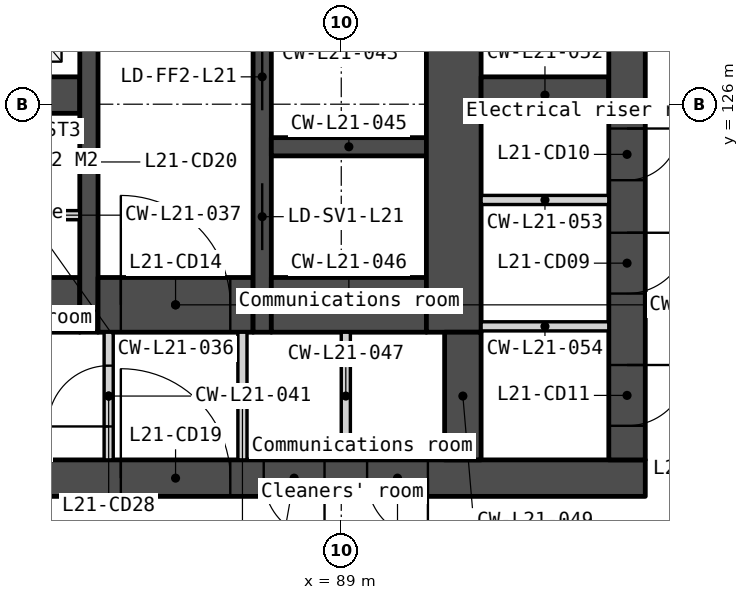
"""IFC4 building model, lengths in metres.
Left out: names, types, materials, properties, quantities, classifications, styles, units other than length and angle.
Written with IfcOpenShell. Run it as: python <this file> out.ifc"""

import sys

from ifc_helpers import new_model, si_unit, direction, frame, frame_2d, origin, place, context, subcontext, project, spatial, polyline, rectangle, outline, extrude, element, fill, save


model = new_model("IFC4")
c1 = context("Model", 3, precision=1e-05, world=origin(), true_north=direction((0.0, 1.0)))
c2 = subcontext(c1, "Body", "Model", "MODEL_VIEW")
j1 = project(units=[si_unit("LENGTHUNIT", "METRE"), si_unit("PLANEANGLEUNIT", "RADIAN")], contexts=[c1])
p1 = place(None, origin())
s1 = spatial("IfcSite", under=j1, at=p1, CompositionType="ELEMENT")
p2 = place(p1, origin())
s2 = spatial("IfcBuilding", under=s1, at=p2, CompositionType="ELEMENT")
p3 = place(p2, frame((0.0, 0.0, 88.8)))
s3 = spatial("IfcBuildingStorey", under=s2, at=p3, CompositionType="ELEMENT", Elevation=88.8)
p4 = place(p3, frame((66.0, 119.85, 0.0), z_axis=(0.0, 0.0, 1.0), x_axis=(1.0, 0.0, 0.0)))
e1 = element("IfcWall", 1, at=p4, inside=s3, PredefinedType="SOLIDWALL", context=c2, shape_type="SweptSolid", body=[
    extrude(rectangle(XDim=28.0, YDim=0.6, at=frame_2d((14.0, 0.0))), origin(), (0.0, 0.0, 1.0), 3.35),
])
p5 = place(p4, frame((6.825, 0.0, 0.0)))
e2 = element("IfcOpeningElement", 2, at=p5, cuts=e1, PredefinedType="OPENING", context=c2, shape_type="SweptSolid", body=[
    extrude(rectangle(XDim=1.8, YDim=2.1, at=frame_2d((0.9, 1.05))), frame((0.0, 0.31, 0.0), z_axis=(0.0, -1.0, 0.0), x_axis=(1.0, 0.0, 0.0)), (0.0, 0.0, 1.0), 0.62),
])
p6 = place(p4, frame((15.85, 0.0, 0.0)))
e3 = element("IfcOpeningElement", 3, at=p6, cuts=e1, PredefinedType="OPENING", context=c2, shape_type="SweptSolid", body=[
    extrude(rectangle(XDim=1.5, YDim=2.1, at=frame_2d((0.75, 1.05))), frame((0.0, 0.31, 0.0), z_axis=(0.0, -1.0, 0.0), x_axis=(1.0, 0.0, 0.0)), (0.0, 0.0, 1.0), 0.62),
])
p7 = place(p4, frame((19.375, 0.0, 0.0)))
e4 = element("IfcOpeningElement", 4, at=p7, cuts=e1, PredefinedType="OPENING", context=c2, shape_type="SweptSolid", body=[
    extrude(rectangle(XDim=1.8, YDim=2.1, at=frame_2d((0.9, 1.05))), frame((0.0, 0.31, 0.0), z_axis=(0.0, -1.0, 0.0), x_axis=(1.0, 0.0, 0.0)), (0.0, 0.0, 1.0), 0.62),
])
p8 = place(p4, frame((4.425, 0.0, 0.0)))
e5 = element("IfcOpeningElement", 5, at=p8, cuts=e1, PredefinedType="OPENING", context=c2, shape_type="SweptSolid", body=[
    extrude(rectangle(XDim=1.0, YDim=2.1, at=frame_2d((0.5, 1.05))), frame((0.0, 0.31, 0.0), z_axis=(0.0, -1.0, 0.0), x_axis=(1.0, 0.0, 0.0)), (0.0, 0.0, 1.0), 0.62),
])
p9 = place(p4, frame((9.783, 0.0, 0.0)))
e6 = element("IfcOpeningElement", 6, at=p9, cuts=e1, PredefinedType="OPENING", context=c2, shape_type="SweptSolid", body=[
    extrude(rectangle(XDim=1.0, YDim=2.1, at=frame_2d((0.5, 1.05))), frame((0.0, 0.31, 0.0), z_axis=(0.0, -1.0, 0.0), x_axis=(1.0, 0.0, 0.0)), (0.0, 0.0, 1.0), 0.62),
])
p10 = place(p4, frame((11.525, 0.0, 0.0)))
e7 = element("IfcOpeningElement", 7, at=p10, cuts=e1, PredefinedType="OPENING", context=c2, shape_type="SweptSolid", body=[
    extrude(rectangle(XDim=1.0, YDim=2.1, at=frame_2d((0.5, 1.05))), frame((0.0, 0.31, 0.0), z_axis=(0.0, -1.0, 0.0), x_axis=(1.0, 0.0, 0.0)), (0.0, 0.0, 1.0), 0.62),
])
p11 = place(p4, frame((13.658, 0.0, 0.0)))
e8 = element("IfcOpeningElement", 8, at=p11, cuts=e1, PredefinedType="OPENING", context=c2, shape_type="SweptSolid", body=[
    extrude(rectangle(XDim=1.0, YDim=2.1, at=frame_2d((0.5, 1.05))), frame((0.0, 0.31, 0.0), z_axis=(0.0, -1.0, 0.0), x_axis=(1.0, 0.0, 0.0)), (0.0, 0.0, 1.0), 0.62),
])
p12 = place(p4, frame((21.725, 0.0, 0.0)))
e9 = element("IfcOpeningElement", 9, at=p12, cuts=e1, PredefinedType="OPENING", context=c2, shape_type="SweptSolid", body=[
    extrude(rectangle(XDim=1.0, YDim=2.1, at=frame_2d((0.5, 1.05))), frame((0.0, 0.31, 0.0), z_axis=(0.0, -1.0, 0.0), x_axis=(1.0, 0.0, 0.0)), (0.0, 0.0, 1.0), 0.62),
])
p13 = place(p4, frame((23.425, 0.0, 0.0)))
e10 = element("IfcOpeningElement", 10, at=p13, cuts=e1, PredefinedType="OPENING", context=c2, shape_type="SweptSolid", body=[
    extrude(rectangle(XDim=1.0, YDim=2.1, at=frame_2d((0.5, 1.05))), frame((0.0, 0.31, 0.0), z_axis=(0.0, -1.0, 0.0), x_axis=(1.0, 0.0, 0.0)), (0.0, 0.0, 1.0), 0.62),
])
p14 = place(p3, frame((81.8, 122.7, 0.0), z_axis=(0.0, 0.0, 1.0), x_axis=(1.0, 0.0, 0.0)))
e11 = element("IfcWall", 11, at=p14, inside=s3, PredefinedType="SOLIDWALL", context=c2, shape_type="SweptSolid", body=[
    extrude(rectangle(XDim=2.9, YDim=0.9, at=frame_2d((1.45, 0.0))), origin(), (0.0, 0.0, 1.0), 3.35),
])
p15 = place(p14, frame((0.05, 0.0, 0.0)))
e12 = element("IfcOpeningElement", 12, at=p15, cuts=e11, PredefinedType="OPENING", context=c2, shape_type="SweptSolid", body=[
    extrude(rectangle(XDim=1.5, YDim=2.1, at=frame_2d((0.75, 1.05))), frame((0.0, 0.46, 0.0), z_axis=(0.0, -1.0, 0.0), x_axis=(1.0, 0.0, 0.0)), (0.0, 0.0, 1.0), 0.92),
])
p16 = place(p3, frame((82.6, 126.15, 0.0), z_axis=(0.0, 0.0, 1.0), x_axis=(1.0, 0.0, 0.0)))
e13 = element("IfcWall", 13, at=p16, inside=s3, PredefinedType="SOLIDWALL", context=c2, shape_type="SweptSolid", body=[
    extrude(rectangle(XDim=2.1, YDim=0.6, at=frame_2d((1.05, 0.0))), origin(), (0.0, 0.0, 1.0), 3.35),
])
p17 = place(p3, frame((83.35, 124.175, 0.0), z_axis=(0.0, 0.0, 1.0), x_axis=(1.0, 0.0, 0.0)))
e14 = element("IfcWall", 14, at=p17, inside=s3, PredefinedType="PARTITIONING", context=c2, shape_type="SweptSolid", body=[
    extrude(rectangle(XDim=1.35, YDim=0.15, at=frame_2d((0.675, 0.0))), origin(), (0.0, 0.0, 1.0), 3.35),
])
p18 = place(p3, frame((84.85, 133.95, 0.0), z_axis=(0.0, 0.0, 1.0), x_axis=(0.0, -1.0, 0.0)))
e15 = element("IfcWall", 15, at=p18, inside=s3, PredefinedType="SOLIDWALL", context=c2, shape_type="SweptSolid", body=[
    extrude(rectangle(XDim=11.7, YDim=0.3, at=frame_2d((5.85, 0.0))), origin(), (0.0, 0.0, 1.0), 3.35),
])
p19 = place(p3, frame((85.0, 122.7, 0.0), z_axis=(0.0, 0.0, 1.0), x_axis=(1.0, 0.0, 0.0)))
e16 = element("IfcWall", 16, at=p19, inside=s3, PredefinedType="SOLIDWALL", context=c2, shape_type="SweptSolid", body=[
    extrude(rectangle(XDim=2.55, YDim=0.9, at=frame_2d((1.275, 0.0))), origin(), (0.0, 0.0, 1.0), 3.35),
])
p20 = place(p19, frame((0.375, 0.0, 0.0)))
e17 = element("IfcOpeningElement", 17, at=p20, cuts=e16, PredefinedType="OPENING", context=c2, shape_type="SweptSolid", body=[
    extrude(rectangle(XDim=1.8, YDim=2.1, at=frame_2d((0.9, 1.05))), frame((0.0, 0.46, 0.0), z_axis=(0.0, -1.0, 0.0), x_axis=(1.0, 0.0, 0.0)), (0.0, 0.0, 1.0), 0.92),
])
p21 = place(p3, frame((85.175, 122.25, 0.0), z_axis=(0.0, 0.0, 1.0), x_axis=(0.0, -1.0, 0.0)))
e18 = element("IfcWall", 18, at=p21, inside=s3, PredefinedType="PARTITIONING", context=c2, shape_type="SweptSolid", body=[
    extrude(rectangle(XDim=2.1, YDim=0.15, at=frame_2d((1.05, 0.0))), origin(), (0.0, 0.0, 1.0), 3.35),
])
p22 = place(p21, frame((0.55, 0.0, 0.0)))
e19 = element("IfcOpeningElement", 19, at=p22, cuts=e18, PredefinedType="OPENING", context=c2, shape_type="SweptSolid", body=[
    extrude(rectangle(XDim=1.0, YDim=2.1, at=frame_2d((0.5, 1.05))), frame((0.0, 0.085, 0.0), z_axis=(0.0, -1.0, 0.0), x_axis=(1.0, 0.0, 0.0)), (0.0, 0.0, 1.0), 0.17),
])
p23 = place(p3, frame((87.375, 122.25, 0.0), z_axis=(0.0, 0.0, 1.0), x_axis=(0.0, -1.0, 0.0)))
e20 = element("IfcWall", 20, at=p23, inside=s3, PredefinedType="PARTITIONING", context=c2, shape_type="SweptSolid", body=[
    extrude(rectangle(XDim=2.1, YDim=0.15, at=frame_2d((1.05, 0.0))), origin(), (0.0, 0.0, 1.0), 3.35),
])
p24 = place(p3, frame((87.7, 133.95, 0.0), z_axis=(0.0, 0.0, 1.0), x_axis=(0.0, -1.0, 0.0)))
e21 = element("IfcWall", 21, at=p24, inside=s3, PredefinedType="SOLIDWALL", context=c2, shape_type="SweptSolid", body=[
    extrude(rectangle(XDim=11.7, YDim=0.3, at=frame_2d((5.85, 0.0))), origin(), (0.0, 0.0, 1.0), 3.35),
])
p25 = place(p24, frame((6.95, 0.0, 0.0)))
e22 = element("IfcOpeningElement", 22, at=p25, cuts=e21, PredefinedType="OPENING", context=c2, shape_type="SweptSolid", body=[
    extrude(rectangle(XDim=1.1, YDim=2.1, at=frame_2d((0.55, 1.05))), frame((0.0, 0.16, 0.0), z_axis=(0.0, -1.0, 0.0), x_axis=(1.0, 0.0, 0.0)), (0.0, 0.0, 1.0), 0.32),
])
p26 = place(p24, frame((5.1, 0.0, 0.0)))
e23 = element("IfcOpeningElement", 23, at=p26, cuts=e21, PredefinedType="OPENING", context=c2, shape_type="SweptSolid", body=[
    extrude(rectangle(XDim=1.0, YDim=2.1, at=frame_2d((0.5, 1.05))), frame((0.0, 0.16, 0.0), z_axis=(0.0, -1.0, 0.0), x_axis=(1.0, 0.0, 0.0)), (0.0, 0.0, 1.0), 0.32),
])
p27 = place(p24, frame((9.25, 0.0, 0.0)))
e24 = element("IfcOpeningElement", 24, at=p27, cuts=e21, PredefinedType="OPENING", context=c2, shape_type="SweptSolid", body=[
    extrude(rectangle(XDim=1.1, YDim=2.1, at=frame_2d((0.55, 1.05))), frame((0.0, 0.16, 0.0), z_axis=(0.0, -1.0, 0.0), x_axis=(1.0, 0.0, 0.0)), (0.0, 0.0, 1.0), 0.32),
])
p28 = place(p3, frame((87.85, 125.3, 0.0), z_axis=(0.0, 0.0, 1.0), x_axis=(1.0, 0.0, 0.0)))
e25 = element("IfcWall", 25, at=p28, inside=s3, PredefinedType="SOLIDWALL", context=c2, shape_type="SweptSolid", body=[
    extrude(rectangle(XDim=2.55, YDim=0.3, at=frame_2d((1.275, 0.0))), origin(), (0.0, 0.0, 1.0), 3.35),
])
p29 = place(p3, frame((87.85, 122.7, 0.0), z_axis=(0.0, 0.0, 1.0), x_axis=(1.0, 0.0, 0.0)))
e26 = element("IfcWall", 26, at=p29, inside=s3, PredefinedType="SOLIDWALL", context=c2, shape_type="SweptSolid", body=[
    extrude(rectangle(XDim=2.55, YDim=0.9, at=frame_2d((1.275, 0.0))), origin(), (0.0, 0.0, 1.0), 3.35),
])
p30 = place(p3, frame((89.075, 122.25, 0.0), z_axis=(0.0, 0.0, 1.0), x_axis=(0.0, -1.0, 0.0)))
e27 = element("IfcWall", 27, at=p30, inside=s3, PredefinedType="PARTITIONING", context=c2, shape_type="SweptSolid", body=[
    extrude(rectangle(XDim=2.1, YDim=0.15, at=frame_2d((1.05, 0.0))), origin(), (0.0, 0.0, 1.0), 3.35),
])
p31 = place(p3, frame((90.85, 133.95, 0.0), z_axis=(0.0, 0.0, 1.0), x_axis=(0.0, -1.0, 0.0)))
e28 = element("IfcWall", 28, at=p31, inside=s3, PredefinedType="SOLIDWALL", context=c2, shape_type="SweptSolid", body=[
    extrude(rectangle(XDim=11.7, YDim=0.9, at=frame_2d((5.85, 0.0))), origin(), (0.0, 0.0, 1.0), 3.35),
])
p32 = place(p3, frame((91.0, 122.25, 0.0), z_axis=(0.0, 0.0, 1.0), x_axis=(0.0, -1.0, 0.0)))
e29 = element("IfcWall", 29, at=p32, inside=s3, PredefinedType="SOLIDWALL", context=c2, shape_type="SweptSolid", body=[
    extrude(rectangle(XDim=2.1, YDim=0.6, at=frame_2d((1.05, 0.0))), origin(), (0.0, 0.0, 1.0), 3.35),
])
p33 = place(p3, frame((91.3, 126.15, 0.0), z_axis=(0.0, 0.0, 1.0), x_axis=(1.0, 0.0, 0.0)))
e30 = element("IfcWall", 30, at=p33, inside=s3, PredefinedType="SOLIDWALL", context=c2, shape_type="SweptSolid", body=[
    extrude(rectangle(XDim=2.1, YDim=0.6, at=frame_2d((1.05, 0.0))), origin(), (0.0, 0.0, 1.0), 3.35),
])
for number, where, z_axis, x_axis in (
    (31, (91.3, 124.425, 0.0), (0.0, 0.0, 1.0), (1.0, 0.0, 0.0)),
    (32, (91.3, 122.346, 0.0), (0.0, 0.0, 1.0), (1.0, 0.0, 0.0)),
):
    element("IfcWall", number, at=place(p3, frame(where, z_axis=z_axis, x_axis=x_axis)), inside=s3, PredefinedType="PARTITIONING", context=c2, shape_type="SweptSolid", body=[
        extrude(rectangle(XDim=2.1, YDim=0.15, at=frame_2d((1.05, 0.0))), origin(), (0.0, 0.0, 1.0), 3.35),
    ])
p34 = place(p3, frame((93.7, 133.95, 0.0), z_axis=(0.0, 0.0, 1.0), x_axis=(0.0, -1.0, 0.0)))
e33 = element("IfcWall", 33, at=p34, inside=s3, PredefinedType="SOLIDWALL", context=c2, shape_type="SweptSolid", body=[
    extrude(rectangle(XDim=13.8, YDim=0.6, at=frame_2d((6.9, 0.0))), origin(), (0.0, 0.0, 1.0), 3.35),
])
p35 = place(p34, frame((0.6, 0.0, 0.0)))
e34 = element("IfcOpeningElement", 34, at=p35, cuts=e33, PredefinedType="OPENING", context=c2, shape_type="SweptSolid", body=[
    extrude(rectangle(XDim=1.1, YDim=2.1, at=frame_2d((0.55, 1.05))), frame((0.0, 0.31, 0.0), z_axis=(0.0, -1.0, 0.0), x_axis=(1.0, 0.0, 0.0)), (0.0, 0.0, 1.0), 0.62),
])
p36 = place(p34, frame((10.064, 0.0, 0.0)))
e35 = element("IfcOpeningElement", 35, at=p36, cuts=e33, PredefinedType="OPENING", context=c2, shape_type="SweptSolid", body=[
    extrude(rectangle(XDim=1.0, YDim=2.1, at=frame_2d((0.5, 1.05))), frame((0.0, 0.31, 0.0), z_axis=(0.0, -1.0, 0.0), x_axis=(1.0, 0.0, 0.0)), (0.0, 0.0, 1.0), 0.62),
])
p37 = place(p34, frame((8.35, 0.0, 0.0)))
e36 = element("IfcOpeningElement", 36, at=p37, cuts=e33, PredefinedType="OPENING", context=c2, shape_type="SweptSolid", body=[
    extrude(rectangle(XDim=0.85, YDim=2.1, at=frame_2d((0.425, 1.05))), frame((0.0, 0.31, 0.0), z_axis=(0.0, -1.0, 0.0), x_axis=(1.0, 0.0, 0.0)), (0.0, 0.0, 1.0), 0.62),
])
p38 = place(p34, frame((12.239, 0.0, 0.0)))
e37 = element("IfcOpeningElement", 37, at=p38, cuts=e33, PredefinedType="OPENING", context=c2, shape_type="SweptSolid", body=[
    extrude(rectangle(XDim=1.0, YDim=2.1, at=frame_2d((0.5, 1.05))), frame((0.0, 0.31, 0.0), z_axis=(0.0, -1.0, 0.0), x_axis=(1.0, 0.0, 0.0)), (0.0, 0.0, 1.0), 0.62),
])
p39 = place(p3, frame((82.605, 93.333, -0.15), z_axis=(0.0, 0.0, 1.0), x_axis=(0.500000478905, 0.866025127289, 0.0)))
e38 = element("IfcWall", 38, at=p39, inside=s3, PredefinedType="SOLIDWALL", context=c2, shape_type="SweptSolid", body=[
    extrude(outline(polyline([(42.643, 0.0), (42.643, 3.5), (0.0, 3.5), (0.0, 0.0), (42.643, 0.0)])), frame((0.0, 0.225, 0.0), z_axis=(0.0, -1.0, 0.0), x_axis=(1.0, 0.0, 0.0)), (0.0, 0.0, 1.0), 0.45),
])
p40 = place(p39, frame((0.72, 0.0, 1.05)))
e39 = element("IfcOpeningElement", 39, at=p40, cuts=e38, PredefinedType="OPENING", context=c2, shape_type="SweptSolid", body=[
    extrude(rectangle(XDim=1.2, YDim=1.5, at=frame_2d((0.6, 0.75))), frame((0.0, 0.235, 0.0), z_axis=(0.0, -1.0, 0.0), x_axis=(1.0, 0.0, 0.0)), (0.0, 0.0, 1.0), 0.47),
])
p41 = place(p39, frame((7.079, 0.0, 1.05)))
e40 = element("IfcOpeningElement", 40, at=p41, cuts=e38, PredefinedType="OPENING", context=c2, shape_type="SweptSolid", body=[
    extrude(rectangle(XDim=1.2, YDim=1.5, at=frame_2d((0.6, 0.75))), frame((0.0, 0.235, 0.0), z_axis=(0.0, -1.0, 0.0), x_axis=(1.0, 0.0, 0.0)), (0.0, 0.0, 1.0), 0.47),
])
p42 = place(p39, frame((8.779, 0.0, 1.05)))
e41 = element("IfcOpeningElement", 41, at=p42, cuts=e38, PredefinedType="OPENING", context=c2, shape_type="SweptSolid", body=[
    extrude(rectangle(XDim=1.2, YDim=1.5, at=frame_2d((0.6, 0.75))), frame((0.0, 0.235, 0.0), z_axis=(0.0, -1.0, 0.0), x_axis=(1.0, 0.0, 0.0)), (0.0, 0.0, 1.0), 0.47),
])
p43 = place(p39, frame((15.607, 0.0, 1.05)))
e42 = element("IfcOpeningElement", 42, at=p43, cuts=e38, PredefinedType="OPENING", context=c2, shape_type="SweptSolid", body=[
    extrude(rectangle(XDim=1.2, YDim=1.5, at=frame_2d((0.6, 0.75))), frame((0.0, 0.235, 0.0), z_axis=(0.0, -1.0, 0.0), x_axis=(1.0, 0.0, 0.0)), (0.0, 0.0, 1.0), 0.47),
])
p44 = place(p39, frame((17.307, 0.0, 1.05)))
e43 = element("IfcOpeningElement", 43, at=p44, cuts=e38, PredefinedType="OPENING", context=c2, shape_type="SweptSolid", body=[
    extrude(rectangle(XDim=1.2, YDim=1.5, at=frame_2d((0.6, 0.75))), frame((0.0, 0.235, 0.0), z_axis=(0.0, -1.0, 0.0), x_axis=(1.0, 0.0, 0.0)), (0.0, 0.0, 1.0), 0.47),
])
p45 = place(p39, frame((24.136, 0.0, 1.05)))
e44 = element("IfcOpeningElement", 44, at=p45, cuts=e38, PredefinedType="OPENING", context=c2, shape_type="SweptSolid", body=[
    extrude(rectangle(XDim=1.2, YDim=1.5, at=frame_2d((0.6, 0.75))), frame((0.0, 0.235, 0.0), z_axis=(0.0, -1.0, 0.0), x_axis=(1.0, 0.0, 0.0)), (0.0, 0.0, 1.0), 0.47),
])
p46 = place(p39, frame((25.836, 0.0, 1.05)))
e45 = element("IfcOpeningElement", 45, at=p46, cuts=e38, PredefinedType="OPENING", context=c2, shape_type="SweptSolid", body=[
    extrude(rectangle(XDim=1.2, YDim=1.5, at=frame_2d((0.6, 0.75))), frame((0.0, 0.235, 0.0), z_axis=(0.0, -1.0, 0.0), x_axis=(1.0, 0.0, 0.0)), (0.0, 0.0, 1.0), 0.47),
])
p47 = place(p39, frame((32.665, 0.0, 1.05)))
e46 = element("IfcOpeningElement", 46, at=p47, cuts=e38, PredefinedType="OPENING", context=c2, shape_type="SweptSolid", body=[
    extrude(rectangle(XDim=1.2, YDim=1.5, at=frame_2d((0.6, 0.75))), frame((0.0, 0.235, 0.0), z_axis=(0.0, -1.0, 0.0), x_axis=(1.0, 0.0, 0.0)), (0.0, 0.0, 1.0), 0.47),
])
p48 = place(p39, frame((34.365, 0.0, 1.05)))
e47 = element("IfcOpeningElement", 47, at=p48, cuts=e38, PredefinedType="OPENING", context=c2, shape_type="SweptSolid", body=[
    extrude(rectangle(XDim=1.2, YDim=1.5, at=frame_2d((0.6, 0.75))), frame((0.0, 0.235, 0.0), z_axis=(0.0, -1.0, 0.0), x_axis=(1.0, 0.0, 0.0)), (0.0, 0.0, 1.0), 0.47),
])
p49 = place(p39, frame((40.722, 0.0, 1.05)))
e48 = element("IfcOpeningElement", 48, at=p49, cuts=e38, PredefinedType="OPENING", context=c2, shape_type="SweptSolid", body=[
    extrude(rectangle(XDim=1.2, YDim=1.5, at=frame_2d((0.6, 0.75))), frame((0.0, 0.235, 0.0), z_axis=(0.0, -1.0, 0.0), x_axis=(1.0, 0.0, 0.0)), (0.0, 0.0, 1.0), 0.47),
])
p50 = place(p36, origin())
e49 = element("IfcDoor", 49, at=p50, inside=s3, OperationType="SINGLE_SWING_LEFT", PredefinedType="DOOR", context=c2, shape_type="SweptSolid", body=[
    extrude(rectangle(XDim=1.0, YDim=2.1, at=frame_2d((0.5, 1.05))), frame((0.0, 0.025, 0.0), z_axis=(0.0, -1.0, 0.0), x_axis=(1.0, 0.0, 0.0)), (0.0, 0.0, 1.0), 0.05),
])
fill(e35, e49)
p51 = place(p37, origin())
e50 = element("IfcDoor", 50, at=p51, inside=s3, OperationType="SINGLE_SWING_LEFT", PredefinedType="DOOR", context=c2, shape_type="SweptSolid", body=[
    extrude(rectangle(XDim=0.85, YDim=2.1, at=frame_2d((0.425, 1.05))), frame((0.0, 0.025, 0.0), z_axis=(0.0, -1.0, 0.0), x_axis=(1.0, 0.0, 0.0)), (0.0, 0.0, 1.0), 0.05),
])
fill(e36, e50)
p52 = place(p38, origin())
e51 = element("IfcDoor", 51, at=p52, inside=s3, OperationType="SINGLE_SWING_LEFT", PredefinedType="DOOR", context=c2, shape_type="SweptSolid", body=[
    extrude(rectangle(XDim=1.0, YDim=2.1, at=frame_2d((0.5, 1.05))), frame((0.0, 0.025, 0.0), z_axis=(0.0, -1.0, 0.0), x_axis=(1.0, 0.0, 0.0)), (0.0, 0.0, 1.0), 0.05),
])
fill(e37, e51)
p53 = place(p25, origin())
e52 = element("IfcDoor", 52, at=p53, inside=s3, OperationType="SLIDING_TO_LEFT", PredefinedType="DOOR", context=c2, shape_type="SweptSolid", body=[
    extrude(rectangle(XDim=1.1, YDim=2.1, at=frame_2d((0.55, 1.05))), frame((0.0, 0.025, 0.0), z_axis=(0.0, -1.0, 0.0), x_axis=(1.0, 0.0, 0.0)), (0.0, 0.0, 1.0), 0.05),
])
fill(e22, e52)
p54 = place(p20, origin())
e53 = element("IfcDoor", 53, at=p54, inside=s3, OperationType="DOUBLE_DOOR_DOUBLE_SWING", PredefinedType="DOOR", context=c2, shape_type="SweptSolid", body=[
    extrude(rectangle(XDim=1.8, YDim=2.1, at=frame_2d((0.9, 1.05))), frame((0.0, 0.025, 0.0), z_axis=(0.0, -1.0, 0.0), x_axis=(1.0, 0.0, 0.0)), (0.0, 0.0, 1.0), 0.05),
])
fill(e17, e53)
p55 = place(p7, origin())
e54 = element("IfcDoor", 54, at=p55, inside=s3, OperationType="DOUBLE_DOOR_DOUBLE_SWING", PredefinedType="DOOR", context=c2, shape_type="SweptSolid", body=[
    extrude(rectangle(XDim=1.8, YDim=2.1, at=frame_2d((0.9, 1.05))), frame((0.0, 0.025, 0.0), z_axis=(0.0, -1.0, 0.0), x_axis=(1.0, 0.0, 0.0)), (0.0, 0.0, 1.0), 0.05),
])
fill(e4, e54)
p56 = place(p22, origin())
e55 = element("IfcDoor", 55, at=p56, inside=s3, OperationType="SINGLE_SWING_RIGHT", PredefinedType="DOOR", context=c2, shape_type="SweptSolid", body=[
    extrude(rectangle(XDim=1.0, YDim=2.1, at=frame_2d((0.5, 1.05))), frame((0.0, 0.025, 0.0), z_axis=(0.0, -1.0, 0.0), x_axis=(1.0, 0.0, 0.0)), (0.0, 0.0, 1.0), 0.05),
])
fill(e19, e55)
p57 = place(p12, origin())
e56 = element("IfcDoor", 56, at=p57, inside=s3, OperationType="SINGLE_SWING_RIGHT", PredefinedType="DOOR", context=c2, shape_type="SweptSolid", body=[
    extrude(rectangle(XDim=1.0, YDim=2.1, at=frame_2d((0.5, 1.05))), frame((0.0, 0.025, 0.0), z_axis=(0.0, -1.0, 0.0), x_axis=(1.0, 0.0, 0.0)), (0.0, 0.0, 1.0), 0.05),
])
fill(e9, e56)
p58 = place(p13, origin())
e57 = element("IfcDoor", 57, at=p58, inside=s3, OperationType="SINGLE_SWING_RIGHT", PredefinedType="DOOR", context=c2, shape_type="SweptSolid", body=[
    extrude(rectangle(XDim=1.0, YDim=2.1, at=frame_2d((0.5, 1.05))), frame((0.0, 0.025, 0.0), z_axis=(0.0, -1.0, 0.0), x_axis=(1.0, 0.0, 0.0)), (0.0, 0.0, 1.0), 0.05),
])
fill(e10, e57)
p59 = place(p27, origin())
e58 = element("IfcDoor", 58, at=p59, inside=s3, OperationType="SLIDING_TO_LEFT", PredefinedType="DOOR", context=c2, shape_type="SweptSolid", body=[
    extrude(rectangle(XDim=1.1, YDim=2.1, at=frame_2d((0.55, 1.05))), frame((0.0, 0.025, 0.0), z_axis=(0.0, -1.0, 0.0), x_axis=(1.0, 0.0, 0.0)), (0.0, 0.0, 1.0), 0.05),
])
fill(e24, e58)
save(model, sys.argv[1])
